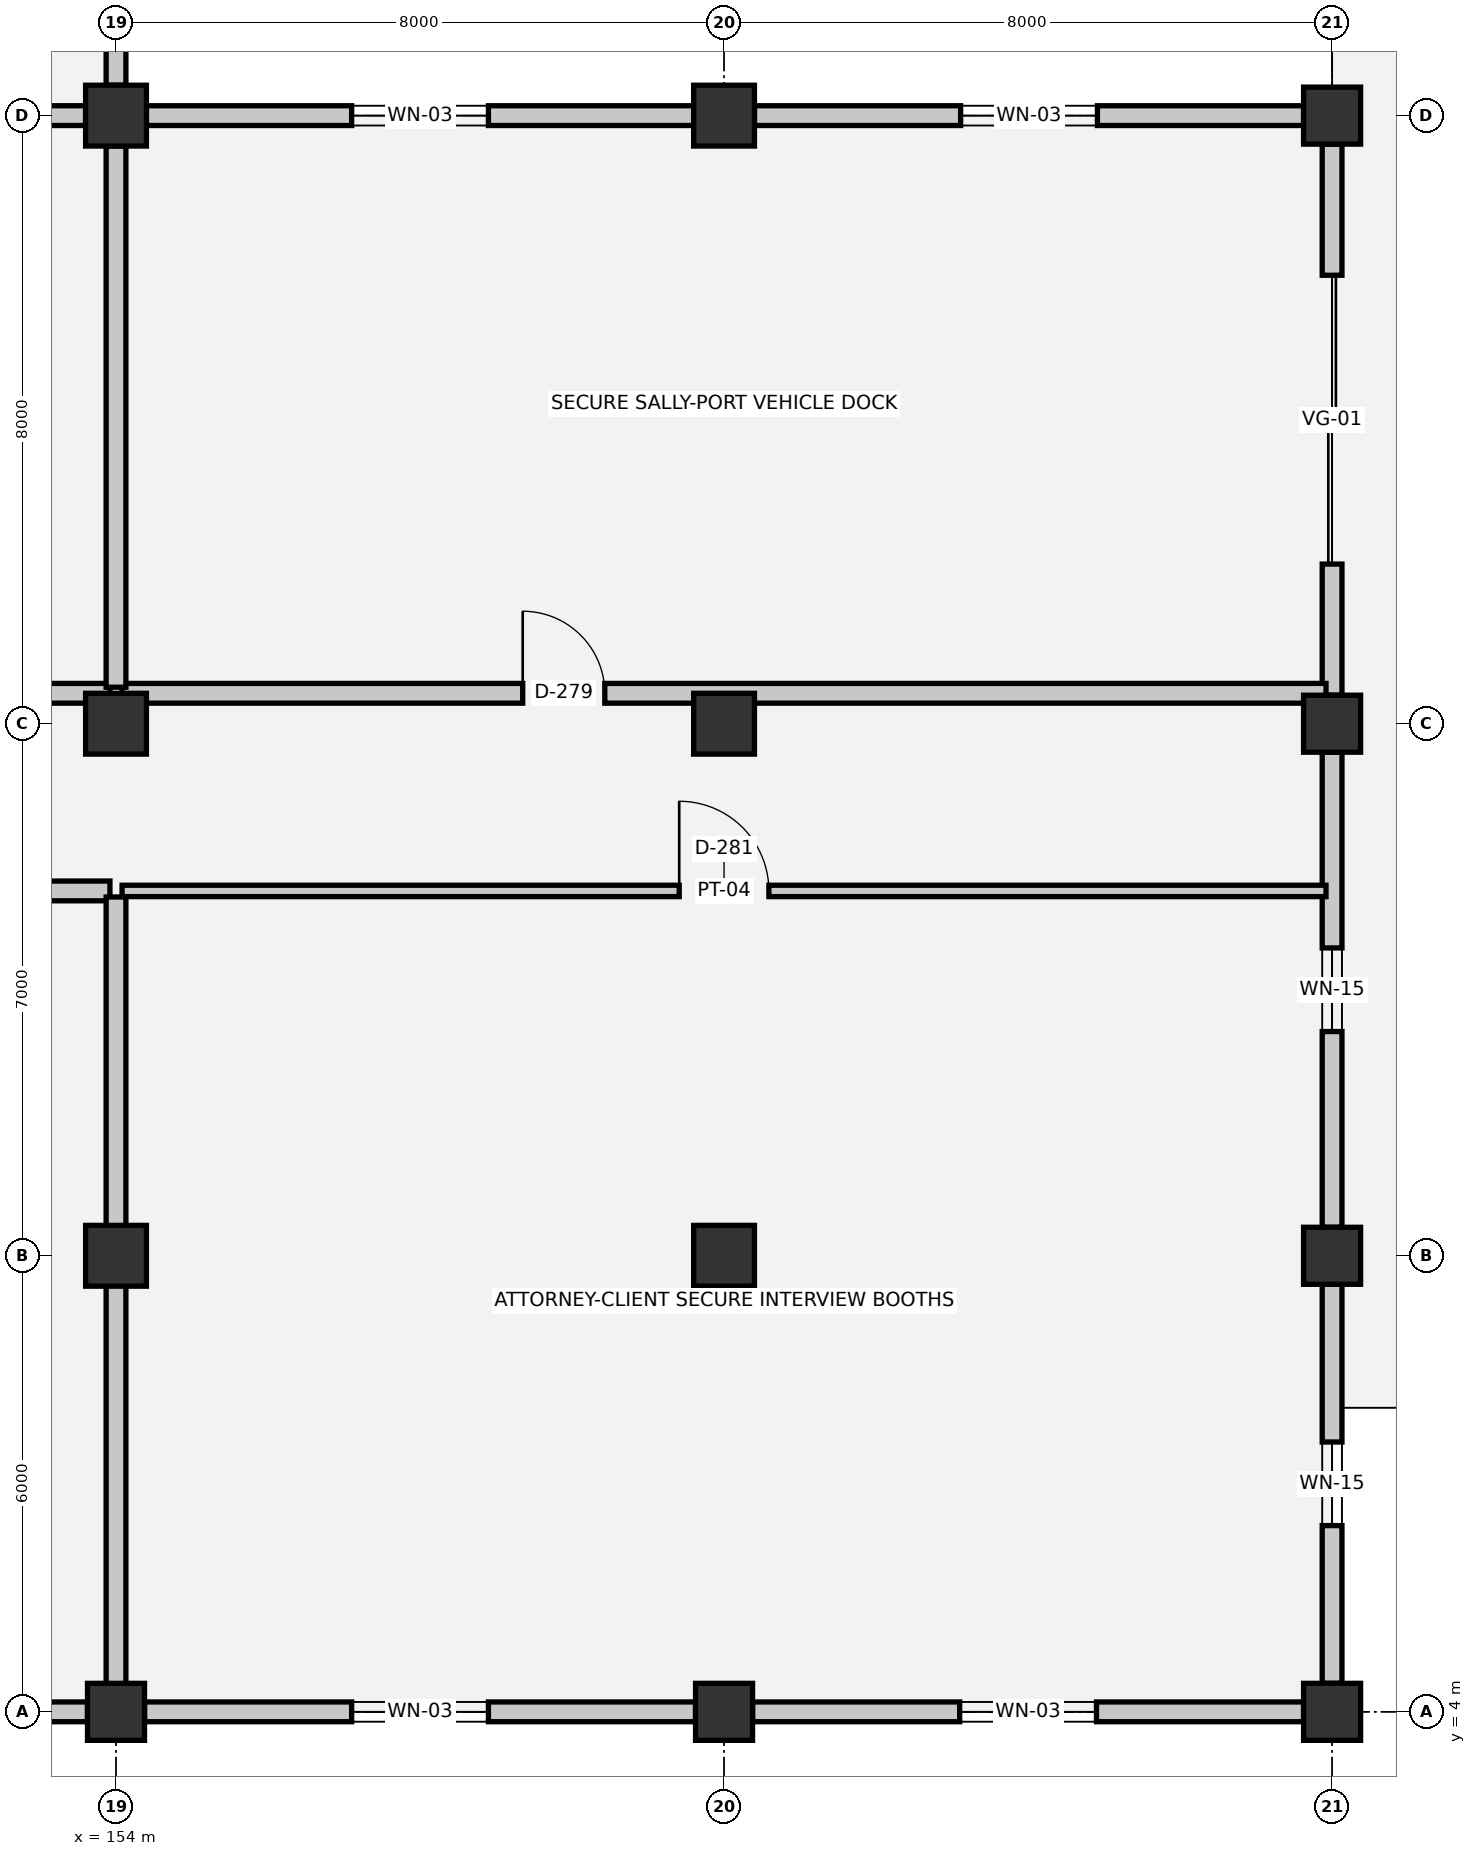
"""IFC4 building model, lengths in metres.
Left out: names, types, materials, properties, quantities, classifications, styles, units other than length and angle.
Written with IfcOpenShell. Run it as: python <this file> out.ifc"""

import sys

from ifc_helpers import new_model, si_unit, direction, frame, frame_2d, origin, origin_2d, place, context, subcontext, project, spatial, rectangle, extrude, element, fill, save


model = new_model("IFC4")
c1 = context("Model", 3, precision=1e-05, world=origin(), true_north=direction((0.0, 1.0)))
c2 = subcontext(c1, "Body", "Model", "MODEL_VIEW")
j1 = project(units=[si_unit("LENGTHUNIT", "METRE"), si_unit("PLANEANGLEUNIT", "RADIAN")], contexts=[c1])
p1 = place(None, origin())
s1 = spatial("IfcSite", under=j1, at=p1, CompositionType="ELEMENT")
p2 = place(p1, origin())
s2 = spatial("IfcBuilding", under=s1, at=p2, CompositionType="ELEMENT")
p3 = place(p2, origin())
s3 = spatial("IfcBuildingStorey", under=s2, at=p3, CompositionType="ELEMENT", Elevation=0.0)
p4 = place(p3, frame((154.0, 4.0, 0.0), z_axis=(0.0, 0.0, 1.0), x_axis=(1.0, 0.0, 0.0)))
e1 = element("IfcColumn", 1, at=p4, inside=s3, PredefinedType="COLUMN", context=c2, shape_type="SweptSolid", body=[
    extrude(rectangle(XDim=0.75, YDim=0.75, at=origin_2d()), origin(), (0.0, 0.0, 1.0), 5.4),
])
for number, where, z_axis, x_axis in (
    (2, (154.0, 10.0, 0.0), (0.0, 0.0, 1.0), (1.0, 0.0, 0.0)),
    (3, (154.0, 17.0, 0.0), (0.0, 0.0, 1.0), (1.0, 0.0, 0.0)),
    (4, (154.0, 25.0, 0.0), (0.0, 0.0, 1.0), (1.0, 0.0, 0.0)),
):
    element("IfcColumn", number, at=place(p3, frame(where, z_axis=z_axis, x_axis=x_axis)), inside=s3, PredefinedType="COLUMN", context=c2, shape_type="SweptSolid", body=[
        extrude(rectangle(XDim=0.8, YDim=0.8, at=origin_2d()), origin(), (0.0, 0.0, 1.0), 5.4),
    ])
p5 = place(p3, frame((162.0, 4.0, 0.0), z_axis=(0.0, 0.0, 1.0), x_axis=(1.0, 0.0, 0.0)))
e5 = element("IfcColumn", 5, at=p5, inside=s3, PredefinedType="COLUMN", context=c2, shape_type="SweptSolid", body=[
    extrude(rectangle(XDim=0.75, YDim=0.75, at=origin_2d()), origin(), (0.0, 0.0, 1.0), 5.4),
])
for number, where, z_axis, x_axis in (
    (6, (162.0, 10.0, 0.0), (0.0, 0.0, 1.0), (1.0, 0.0, 0.0)),
    (7, (162.0, 17.0, 0.0), (0.0, 0.0, 1.0), (1.0, 0.0, 0.0)),
    (8, (162.0, 25.0, 0.0), (0.0, 0.0, 1.0), (1.0, 0.0, 0.0)),
):
    element("IfcColumn", number, at=place(p3, frame(where, z_axis=z_axis, x_axis=x_axis)), inside=s3, PredefinedType="COLUMN", context=c2, shape_type="SweptSolid", body=[
        extrude(rectangle(XDim=0.8, YDim=0.8, at=origin_2d()), origin(), (0.0, 0.0, 1.0), 5.4),
    ])
for number, where, z_axis, x_axis in (
    (9, (170.0, 4.0, 0.0), (0.0, 0.0, 1.0), (1.0, 0.0, 0.0)),
    (10, (170.0, 10.0, 0.0), (0.0, 0.0, 1.0), (1.0, 0.0, 0.0)),
    (11, (170.0, 17.0, 0.0), (0.0, 0.0, 1.0), (1.0, 0.0, 0.0)),
    (12, (170.0, 25.0, 0.0), (0.0, 0.0, 1.0), (1.0, 0.0, 0.0)),
):
    element("IfcColumn", number, at=place(p3, frame(where, z_axis=z_axis, x_axis=x_axis)), inside=s3, PredefinedType="COLUMN", context=c2, shape_type="SweptSolid", body=[
        extrude(rectangle(XDim=0.75, YDim=0.75, at=origin_2d()), origin(), (0.0, 0.0, 1.0), 5.4),
    ])
p6 = place(p3, frame((154.0, 31.6, 0.0), z_axis=(0.0, 0.0, 1.0), x_axis=(0.0, -1.0, 0.0)))
e13 = element("IfcWall", 13, at=p6, inside=s3, PredefinedType="SOLIDWALL", context=c2, shape_type="SweptSolid", body=[
    extrude(rectangle(XDim=6.2, YDim=0.26, at=frame_2d((3.1, 0.0))), origin(), (0.0, 0.0, 1.0), 4.13),
])
p7 = place(p6, frame((2.55, 0.0, 1.0)))
e14 = element("IfcOpeningElement", 14, at=p7, cuts=e13, PredefinedType="OPENING", context=c2, shape_type="SweptSolid", body=[
    extrude(rectangle(XDim=1.1, YDim=1.2, at=frame_2d((0.55, 0.6))), frame((0.0, 0.14, 0.0), z_axis=(0.0, -1.0, 0.0), x_axis=(1.0, 0.0, 0.0)), (0.0, 0.0, 1.0), 0.28),
])
p8 = place(p3, frame((154.4, 25.0, 0.0), z_axis=(0.0, 0.0, 1.0), x_axis=(1.0, 0.0, 0.0)))
e15 = element("IfcWall", 15, at=p8, inside=s3, PredefinedType="SOLIDWALL", context=c2, shape_type="SweptSolid", body=[
    extrude(rectangle(XDim=7.2, YDim=0.26, at=frame_2d((3.6, 0.0))), origin(), (0.0, 0.0, 1.0), 4.13),
])
p9 = place(p8, frame((2.7, 0.0, 0.9)))
e16 = element("IfcOpeningElement", 16, at=p9, cuts=e15, PredefinedType="OPENING", context=c2, shape_type="SweptSolid", body=[
    extrude(rectangle(XDim=1.8, YDim=2.0, at=frame_2d((0.9, 1.0))), frame((0.0, 0.14, 0.0), z_axis=(0.0, -1.0, 0.0), x_axis=(1.0, 0.0, 0.0)), (0.0, 0.0, 1.0), 0.28),
])
p10 = place(p3, frame((162.4, 25.0, 0.0), z_axis=(0.0, 0.0, 1.0), x_axis=(1.0, 0.0, 0.0)))
e17 = element("IfcWall", 17, at=p10, inside=s3, PredefinedType="SOLIDWALL", context=c2, shape_type="SweptSolid", body=[
    extrude(rectangle(XDim=7.225, YDim=0.26, at=frame_2d((3.613, 0.0))), origin(), (0.0, 0.0, 1.0), 4.13),
])
p11 = place(p10, frame((2.712, 0.0, 0.9)))
e18 = element("IfcOpeningElement", 18, at=p11, cuts=e17, PredefinedType="OPENING", context=c2, shape_type="SweptSolid", body=[
    extrude(rectangle(XDim=1.8, YDim=2.0, at=frame_2d((0.9, 1.0))), frame((0.0, 0.14, 0.0), z_axis=(0.0, -1.0, 0.0), x_axis=(1.0, 0.0, 0.0)), (0.0, 0.0, 1.0), 0.28),
])
p12 = place(p3, frame((170.0, 24.625, 0.0), z_axis=(0.0, 0.0, 1.0), x_axis=(0.0, -1.0, 0.0)))
e19 = element("IfcWall", 19, at=p12, inside=s3, PredefinedType="SOLIDWALL", context=c2, shape_type="SweptSolid", body=[
    extrude(rectangle(XDim=7.25, YDim=0.26, at=frame_2d((3.625, 0.0))), origin(), (0.0, 0.0, 1.0), 4.13),
])
p13 = place(p12, frame((1.725, 0.0, 0.0)))
e20 = element("IfcOpeningElement", 20, at=p13, cuts=e19, PredefinedType="OPENING", context=c2, shape_type="SweptSolid", body=[
    extrude(rectangle(XDim=3.8, YDim=3.6, at=frame_2d((1.9, 1.8))), frame((0.0, 0.14, 0.0), z_axis=(0.0, -1.0, 0.0), x_axis=(1.0, 0.0, 0.0)), (0.0, 0.0, 1.0), 0.28),
])
p14 = place(p3, frame((170.0, 16.625, 0.0), z_axis=(0.0, 0.0, 1.0), x_axis=(0.0, -1.0, 0.0)))
e21 = element("IfcWall", 21, at=p14, inside=s3, PredefinedType="SOLIDWALL", context=c2, shape_type="SweptSolid", body=[
    extrude(rectangle(XDim=6.25, YDim=0.26, at=frame_2d((3.125, 0.0))), origin(), (0.0, 0.0, 1.0), 4.13),
])
p15 = place(p14, frame((2.575, 0.0, 1.0)))
e22 = element("IfcOpeningElement", 22, at=p15, cuts=e21, PredefinedType="OPENING", context=c2, shape_type="SweptSolid", body=[
    extrude(rectangle(XDim=1.1, YDim=1.2, at=frame_2d((0.55, 0.6))), frame((0.0, 0.14, 0.0), z_axis=(0.0, -1.0, 0.0), x_axis=(1.0, 0.0, 0.0)), (0.0, 0.0, 1.0), 0.28),
])
p16 = place(p3, frame((170.0, 9.625, 0.0), z_axis=(0.0, 0.0, 1.0), x_axis=(0.0, -1.0, 0.0)))
e23 = element("IfcWall", 23, at=p16, inside=s3, PredefinedType="SOLIDWALL", context=c2, shape_type="SweptSolid", body=[
    extrude(rectangle(XDim=5.25, YDim=0.26, at=frame_2d((2.625, 0.0))), origin(), (0.0, 0.0, 1.0), 4.13),
])
p17 = place(p16, frame((2.075, 0.0, 1.0)))
e24 = element("IfcOpeningElement", 24, at=p17, cuts=e23, PredefinedType="OPENING", context=c2, shape_type="SweptSolid", body=[
    extrude(rectangle(XDim=1.1, YDim=1.2, at=frame_2d((0.55, 0.6))), frame((0.0, 0.14, 0.0), z_axis=(0.0, -1.0, 0.0), x_axis=(1.0, 0.0, 0.0)), (0.0, 0.0, 1.0), 0.28),
])
p18 = place(p3, frame((169.625, 4.0, 0.0), z_axis=(0.0, 0.0, 1.0), x_axis=(-1.0, 0.0, 0.0)))
e25 = element("IfcWall", 25, at=p18, inside=s3, PredefinedType="SOLIDWALL", context=c2, shape_type="SweptSolid", body=[
    extrude(rectangle(XDim=7.25, YDim=0.26, at=frame_2d((3.625, 0.0))), origin(), (0.0, 0.0, 1.0), 4.13),
])
p19 = place(p18, frame((2.725, 0.0, 0.9)))
e26 = element("IfcOpeningElement", 26, at=p19, cuts=e25, PredefinedType="OPENING", context=c2, shape_type="SweptSolid", body=[
    extrude(rectangle(XDim=1.8, YDim=2.0, at=frame_2d((0.9, 1.0))), frame((0.0, 0.14, 0.0), z_axis=(0.0, -1.0, 0.0), x_axis=(1.0, 0.0, 0.0)), (0.0, 0.0, 1.0), 0.28),
])
p20 = place(p3, frame((161.625, 4.0, 0.0), z_axis=(0.0, 0.0, 1.0), x_axis=(-1.0, 0.0, 0.0)))
e27 = element("IfcWall", 27, at=p20, inside=s3, PredefinedType="SOLIDWALL", context=c2, shape_type="SweptSolid", body=[
    extrude(rectangle(XDim=7.25, YDim=0.26, at=frame_2d((3.625, 0.0))), origin(), (0.0, 0.0, 1.0), 4.13),
])
p21 = place(p20, frame((2.725, 0.0, 0.9)))
e28 = element("IfcOpeningElement", 28, at=p21, cuts=e27, PredefinedType="OPENING", context=c2, shape_type="SweptSolid", body=[
    extrude(rectangle(XDim=1.8, YDim=2.0, at=frame_2d((0.9, 1.0))), frame((0.0, 0.14, 0.0), z_axis=(0.0, -1.0, 0.0), x_axis=(1.0, 0.0, 0.0)), (0.0, 0.0, 1.0), 0.28),
])
p22 = place(p3, frame((153.625, 4.0, 0.0), z_axis=(0.0, 0.0, 1.0), x_axis=(-1.0, 0.0, 0.0)))
e29 = element("IfcWall", 29, at=p22, inside=s3, PredefinedType="SOLIDWALL", context=c2, shape_type="SweptSolid", body=[
    extrude(rectangle(XDim=7.25, YDim=0.26, at=frame_2d((3.625, 0.0))), origin(), (0.0, 0.0, 1.0), 4.13),
])
p23 = place(p22, frame((2.725, 0.0, 0.9)))
e30 = element("IfcOpeningElement", 30, at=p23, cuts=e29, PredefinedType="OPENING", context=c2, shape_type="SweptSolid", body=[
    extrude(rectangle(XDim=1.8, YDim=2.0, at=frame_2d((0.9, 1.0))), frame((0.0, 0.14, 0.0), z_axis=(0.0, -1.0, 0.0), x_axis=(1.0, 0.0, 0.0)), (0.0, 0.0, 1.0), 0.28),
])
p24 = place(p3, frame((130.08, 14.8, 0.0), z_axis=(0.0, 0.0, 1.0), x_axis=(1.0, 0.0, 0.0)))
e31 = element("IfcWall", 31, at=p24, inside=s3, PredefinedType="SOLIDWALL", context=c2, shape_type="SweptSolid", body=[
    extrude(rectangle(XDim=23.84, YDim=0.26, at=frame_2d((11.92, 0.0))), origin(), (0.0, 0.0, 1.0), 5.04),
])
p25 = place(p24, frame((11.38, 0.0, 0.0)))
e32 = element("IfcOpeningElement", 32, at=p25, cuts=e31, PredefinedType="OPENING", context=c2, shape_type="SweptSolid", body=[
    extrude(rectangle(XDim=1.08, YDim=2.1, at=frame_2d((0.54, 1.05))), frame((0.0, 0.14, 0.0), z_axis=(0.0, -1.0, 0.0), x_axis=(1.0, 0.0, 0.0)), (0.0, 0.0, 1.0), 0.28),
])
p26 = place(p3, frame((154.08, 14.8, 0.0), z_axis=(0.0, 0.0, 1.0), x_axis=(1.0, 0.0, 0.0)))
e33 = element("IfcWall", 33, at=p26, inside=s3, PredefinedType="PARTITIONING", context=c2, shape_type="SweptSolid", body=[
    extrude(rectangle(XDim=15.84, YDim=0.15, at=frame_2d((7.92, 0.0))), origin(), (0.0, 0.0, 1.0), 5.04),
])
p27 = place(p26, frame((7.33, 0.0, 0.0)))
e34 = element("IfcOpeningElement", 34, at=p27, cuts=e33, PredefinedType="OPENING", context=c2, shape_type="SweptSolid", body=[
    extrude(rectangle(XDim=1.18, YDim=2.2, at=frame_2d((0.59, 1.1))), frame((0.0, 0.085, 0.0), z_axis=(0.0, -1.0, 0.0), x_axis=(1.0, 0.0, 0.0)), (0.0, 0.0, 1.0), 0.17),
])
p28 = place(p3, frame((146.08, 17.4, 0.0), z_axis=(0.0, 0.0, 1.0), x_axis=(1.0, 0.0, 0.0)))
e35 = element("IfcWall", 35, at=p28, inside=s3, PredefinedType="SOLIDWALL", context=c2, shape_type="SweptSolid", body=[
    extrude(rectangle(XDim=7.84, YDim=0.26, at=frame_2d((3.92, 0.0))), origin(), (0.0, 0.0, 1.0), 5.04),
])
p29 = place(p28, frame((3.38, 0.0, 0.0)))
e36 = element("IfcOpeningElement", 36, at=p29, cuts=e35, PredefinedType="OPENING", context=c2, shape_type="SweptSolid", body=[
    extrude(rectangle(XDim=1.08, YDim=2.1, at=frame_2d((0.54, 1.05))), frame((0.0, 0.14, 0.0), z_axis=(0.0, -1.0, 0.0), x_axis=(1.0, 0.0, 0.0)), (0.0, 0.0, 1.0), 0.28),
])
p30 = place(p3, frame((154.08, 17.4, 0.0), z_axis=(0.0, 0.0, 1.0), x_axis=(1.0, 0.0, 0.0)))
e37 = element("IfcWall", 37, at=p30, inside=s3, PredefinedType="SOLIDWALL", context=c2, shape_type="SweptSolid", body=[
    extrude(rectangle(XDim=15.84, YDim=0.26, at=frame_2d((7.92, 0.0))), origin(), (0.0, 0.0, 1.0), 5.04),
])
p31 = place(p30, frame((5.271, 0.0, 0.0)))
e38 = element("IfcOpeningElement", 38, at=p31, cuts=e37, PredefinedType="OPENING", context=c2, shape_type="SweptSolid", body=[
    extrude(rectangle(XDim=1.08, YDim=2.1, at=frame_2d((0.54, 1.05))), frame((0.0, 0.14, 0.0), z_axis=(0.0, -1.0, 0.0), x_axis=(1.0, 0.0, 0.0)), (0.0, 0.0, 1.0), 0.28),
])
p32 = place(p3, frame((146.08, 25.0, 0.0), z_axis=(0.0, 0.0, 1.0), x_axis=(1.0, 0.0, 0.0)))
e39 = element("IfcWall", 39, at=p32, inside=s3, PredefinedType="SOLIDWALL", context=c2, shape_type="SweptSolid", body=[
    extrude(rectangle(XDim=7.52, YDim=0.26, at=frame_2d((3.76, 0.0))), origin(), (0.0, 0.0, 1.0), 4.35),
])
p33 = place(p3, frame((154.0, 4.08, 0.0), z_axis=(0.0, 0.0, 1.0), x_axis=(0.0, 1.0, 0.0)))
e40 = element("IfcWall", 40, at=p33, inside=s3, PredefinedType="SOLIDWALL", context=c2, shape_type="SweptSolid", body=[
    extrude(rectangle(XDim=10.64, YDim=0.26, at=frame_2d((5.32, 0.0))), origin(), (0.0, 0.0, 1.0), 4.45),
])
p34 = place(p3, frame((154.0, 17.48, 0.0), z_axis=(0.0, 0.0, 1.0), x_axis=(0.0, 1.0, 0.0)))
e41 = element("IfcWall", 41, at=p34, inside=s3, PredefinedType="SOLIDWALL", context=c2, shape_type="SweptSolid", body=[
    extrude(rectangle(XDim=7.12, YDim=0.26, at=frame_2d((3.56, 0.0))), origin(), (0.0, 0.0, 1.0), 4.2),
])
p35 = place(p9, origin())
e42 = element("IfcWindow", 42, at=p35, inside=s3, PartitioningType="SINGLE_PANEL", PredefinedType="WINDOW", context=c2, shape_type="SweptSolid", body=[
    extrude(rectangle(XDim=1.8, YDim=2.0, at=frame_2d((0.9, 1.0))), frame((0.0, 0.03, 0.0), z_axis=(0.0, -1.0, 0.0), x_axis=(1.0, 0.0, 0.0)), (0.0, 0.0, 1.0), 0.06),
])
fill(e16, e42)
p36 = place(p11, origin())
e43 = element("IfcWindow", 43, at=p36, inside=s3, PartitioningType="SINGLE_PANEL", PredefinedType="WINDOW", context=c2, shape_type="SweptSolid", body=[
    extrude(rectangle(XDim=1.8, YDim=2.0, at=frame_2d((0.9, 1.0))), frame((0.0, 0.03, 0.0), z_axis=(0.0, -1.0, 0.0), x_axis=(1.0, 0.0, 0.0)), (0.0, 0.0, 1.0), 0.06),
])
fill(e18, e43)
p37 = place(p13, origin())
e44 = element("IfcDoor", 44, at=p37, inside=s3, OperationType="DOUBLE_DOOR_SLIDING", PredefinedType="GATE", context=c2, shape_type="SweptSolid", body=[
    extrude(rectangle(XDim=3.8, YDim=3.6, at=frame_2d((1.9, 1.8))), frame((0.0, 0.025, 0.0), z_axis=(0.0, -1.0, 0.0), x_axis=(1.0, 0.0, 0.0)), (0.0, 0.0, 1.0), 0.05),
])
fill(e20, e44)
p38 = place(p15, origin())
e45 = element("IfcWindow", 45, at=p38, inside=s3, PartitioningType="SINGLE_PANEL", PredefinedType="WINDOW", context=c2, shape_type="SweptSolid", body=[
    extrude(rectangle(XDim=1.1, YDim=1.2, at=frame_2d((0.55, 0.6))), frame((0.0, 0.03, 0.0), z_axis=(0.0, -1.0, 0.0), x_axis=(1.0, 0.0, 0.0)), (0.0, 0.0, 1.0), 0.06),
])
fill(e22, e45)
p39 = place(p17, origin())
e46 = element("IfcWindow", 46, at=p39, inside=s3, PartitioningType="SINGLE_PANEL", PredefinedType="WINDOW", context=c2, shape_type="SweptSolid", body=[
    extrude(rectangle(XDim=1.1, YDim=1.2, at=frame_2d((0.55, 0.6))), frame((0.0, 0.03, 0.0), z_axis=(0.0, -1.0, 0.0), x_axis=(1.0, 0.0, 0.0)), (0.0, 0.0, 1.0), 0.06),
])
fill(e24, e46)
p40 = place(p19, origin())
e47 = element("IfcWindow", 47, at=p40, inside=s3, PartitioningType="SINGLE_PANEL", PredefinedType="WINDOW", context=c2, shape_type="SweptSolid", body=[
    extrude(rectangle(XDim=1.8, YDim=2.0, at=frame_2d((0.9, 1.0))), frame((0.0, 0.03, 0.0), z_axis=(0.0, -1.0, 0.0), x_axis=(1.0, 0.0, 0.0)), (0.0, 0.0, 1.0), 0.06),
])
fill(e26, e47)
p41 = place(p21, origin())
e48 = element("IfcWindow", 48, at=p41, inside=s3, PartitioningType="SINGLE_PANEL", PredefinedType="WINDOW", context=c2, shape_type="SweptSolid", body=[
    extrude(rectangle(XDim=1.8, YDim=2.0, at=frame_2d((0.9, 1.0))), frame((0.0, 0.03, 0.0), z_axis=(0.0, -1.0, 0.0), x_axis=(1.0, 0.0, 0.0)), (0.0, 0.0, 1.0), 0.06),
])
fill(e28, e48)
p42 = place(p31, origin())
e49 = element("IfcDoor", 49, at=p42, inside=s3, OperationType="SINGLE_SWING_LEFT", PredefinedType="DOOR", context=c2, shape_type="SweptSolid", body=[
    extrude(rectangle(XDim=1.08, YDim=2.1, at=frame_2d((0.54, 1.05))), frame((0.0, 0.025, 0.0), z_axis=(0.0, -1.0, 0.0), x_axis=(1.0, 0.0, 0.0)), (0.0, 0.0, 1.0), 0.05),
])
fill(e38, e49)
p43 = place(p27, origin())
e50 = element("IfcDoor", 50, at=p43, inside=s3, OperationType="SINGLE_SWING_LEFT", PredefinedType="DOOR", context=c2, shape_type="SweptSolid", body=[
    extrude(rectangle(XDim=1.18, YDim=2.2, at=frame_2d((0.59, 1.1))), frame((0.0, 0.025, 0.0), z_axis=(0.0, -1.0, 0.0), x_axis=(1.0, 0.0, 0.0)), (0.0, 0.0, 1.0), 0.05),
])
fill(e34, e50)
save(model, sys.argv[1])
